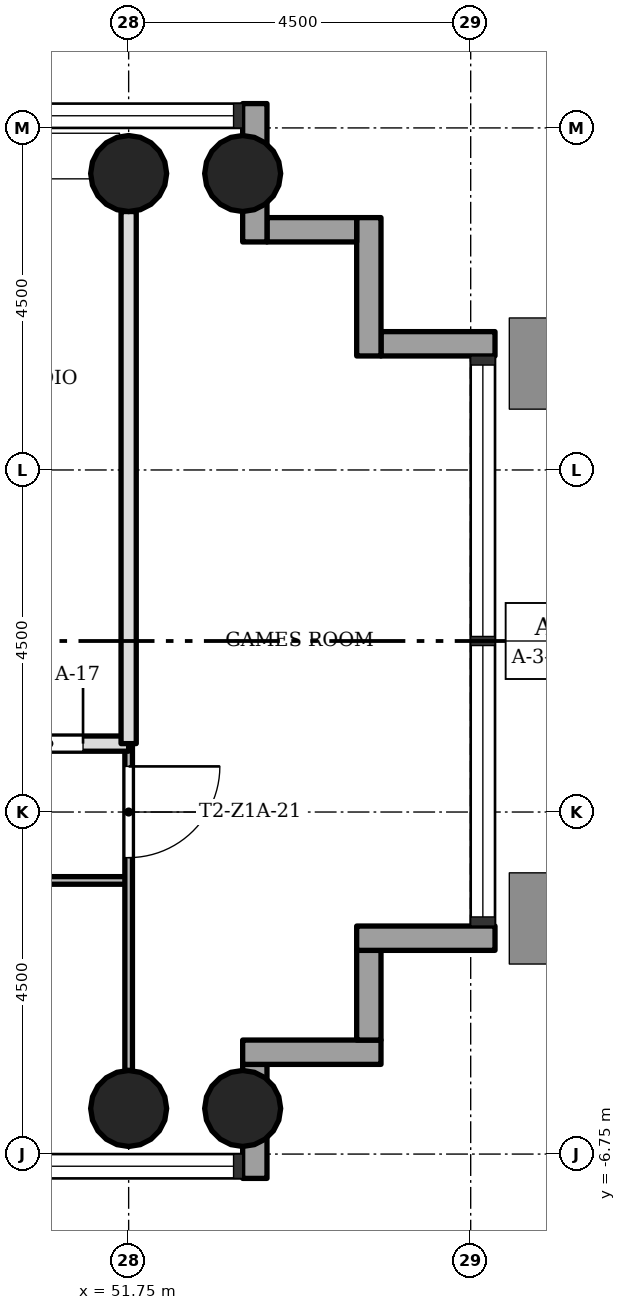
"""IFC4 building model, lengths in metres.
Left out: names, types, materials, properties, quantities, classifications, styles, units other than length and angle.
Written with IfcOpenShell. Run it as: python <this file> out.ifc"""

import sys

from ifc_helpers import new_model, si_unit, direction, frame, frame_2d, origin, origin_2d, place, context, subcontext, project, spatial, rectangle, hollow_circle, extrude, element, fill, save


model = new_model("IFC4")
c1 = context("Model", 3, precision=1e-05, world=origin(), true_north=direction((0.0, 1.0)))
c2 = subcontext(c1, "Body", "Model", "MODEL_VIEW")
j1 = project(units=[si_unit("LENGTHUNIT", "METRE"), si_unit("PLANEANGLEUNIT", "RADIAN")], contexts=[c1])
p1 = place(None, origin())
s1 = spatial("IfcSite", under=j1, at=p1, CompositionType="ELEMENT")
p2 = place(p1, origin())
s2 = spatial("IfcBuilding", under=s1, at=p2, CompositionType="ELEMENT")
p3 = place(p2, frame((0.0, 0.0, 31.3)))
s3 = spatial("IfcBuildingStorey", under=s2, at=p3, CompositionType="ELEMENT", Elevation=31.3)
for number, where, z_axis, x_axis in (
    (1, (51.75, -6.15, 0.0), (0.0, 0.0, 1.0), (1.0, 0.0, 0.0)),
    (2, (51.75, 6.15, 0.0), (0.0, 0.0, 1.0), (1.0, 0.0, 0.0)),
    (3, (53.25, -6.15, 0.0), (0.0, 0.0, 1.0), (1.0, 0.0, 0.0)),
    (4, (53.25, 6.15, 0.0), (0.0, 0.0, 1.0), (1.0, 0.0, 0.0)),
):
    element("IfcColumn", number, at=place(p3, frame(where, z_axis=z_axis, x_axis=x_axis)), inside=s3, PredefinedType="COLUMN", context=c2, shape_type="SweptSolid", body=[
        extrude(hollow_circle(Radius=0.5, WallThickness=0.036, at=origin_2d()), origin(), (0.0, 0.0, 1.0), 3.4),
    ])
p4 = place(p3, frame((53.41, -7.07, -0.3), z_axis=(0.0, 0.0, 1.0), x_axis=(0.0, 1.0, 0.0)))
e5 = element("IfcWall", 5, at=p4, inside=s3, PredefinedType="STANDARD", context=c2, shape_type="SweptSolid", body=[
    extrude(rectangle(XDim=1.5, YDim=0.32, at=frame_2d((0.75, 0.0))), origin(), (0.0, 0.0, 1.0), 3.4),
])
p5 = place(p3, frame((53.25, -5.41, -0.3), z_axis=(0.0, 0.0, 1.0), x_axis=(1.0, 0.0, 0.0)))
e6 = element("IfcWall", 6, at=p5, inside=s3, PredefinedType="STANDARD", context=c2, shape_type="SweptSolid", body=[
    extrude(rectangle(XDim=1.82, YDim=0.32, at=frame_2d((0.91, 0.0))), origin(), (0.0, 0.0, 1.0), 3.4),
])
p6 = place(p3, frame((54.91, -5.25, -0.3), z_axis=(0.0, 0.0, 1.0), x_axis=(0.0, 1.0, 0.0)))
e7 = element("IfcWall", 7, at=p6, inside=s3, PredefinedType="STANDARD", context=c2, shape_type="SweptSolid", body=[
    extrude(rectangle(XDim=1.18, YDim=0.32, at=frame_2d((0.59, 0.0))), origin(), (0.0, 0.0, 1.0), 3.4),
])
p7 = place(p3, frame((54.75, -3.91, -0.3), z_axis=(0.0, 0.0, 1.0), x_axis=(1.0, 0.0, 0.0)))
e8 = element("IfcWall", 8, at=p7, inside=s3, PredefinedType="STANDARD", context=c2, shape_type="SweptSolid", body=[
    extrude(rectangle(XDim=1.82, YDim=0.32, at=frame_2d((0.91, 0.0))), origin(), (0.0, 0.0, 1.0), 3.4),
])
p8 = place(p3, frame((56.57, 3.91, -0.3), z_axis=(0.0, 0.0, 1.0), x_axis=(-1.0, 0.0, 0.0)))
e9 = element("IfcWall", 9, at=p8, inside=s3, PredefinedType="STANDARD", context=c2, shape_type="SweptSolid", body=[
    extrude(rectangle(XDim=1.5, YDim=0.32, at=frame_2d((0.75, 0.0))), origin(), (0.0, 0.0, 1.0), 3.4),
])
p9 = place(p3, frame((54.91, 3.75, -0.3), z_axis=(0.0, 0.0, 1.0), x_axis=(0.0, 1.0, 0.0)))
e10 = element("IfcWall", 10, at=p9, inside=s3, PredefinedType="STANDARD", context=c2, shape_type="SweptSolid", body=[
    extrude(rectangle(XDim=1.82, YDim=0.32, at=frame_2d((0.91, 0.0))), origin(), (0.0, 0.0, 1.0), 3.4),
])
p10 = place(p3, frame((54.75, 5.41, -0.3), z_axis=(0.0, 0.0, 1.0), x_axis=(-1.0, 0.0, 0.0)))
e11 = element("IfcWall", 11, at=p10, inside=s3, PredefinedType="STANDARD", context=c2, shape_type="SweptSolid", body=[
    extrude(rectangle(XDim=1.18, YDim=0.32, at=frame_2d((0.59, 0.0))), origin(), (0.0, 0.0, 1.0), 3.4),
])
p11 = place(p3, frame((53.41, 5.25, -0.3), z_axis=(0.0, 0.0, 1.0), x_axis=(0.0, 1.0, 0.0)))
e12 = element("IfcWall", 12, at=p11, inside=s3, PredefinedType="STANDARD", context=c2, shape_type="SweptSolid", body=[
    extrude(rectangle(XDim=1.82, YDim=0.32, at=frame_2d((0.91, 0.0))), origin(), (0.0, 0.0, 1.0), 3.4),
])
p12 = place(p3, frame((51.75, -3.15, 0.0), z_axis=(0.0, 0.0, 1.0), x_axis=(-1.0, 0.0, 0.0)))
e13 = element("IfcWall", 13, at=p12, inside=s3, PredefinedType="PARTITIONING", context=c2, shape_type="SweptSolid", body=[
    extrude(rectangle(XDim=9.0, YDim=0.1, at=frame_2d((4.5, 0.0))), origin(), (0.0, 0.0, 1.0), 3.0),
])
p13 = place(p12, frame((6.3, 0.0, 0.0)))
e14 = element("IfcOpeningElement", 14, at=p13, cuts=e13, PredefinedType="OPENING", context=c2, shape_type="SweptSolid", body=[
    extrude(rectangle(XDim=0.9, YDim=2.1, at=frame_2d((0.45, 1.05))), frame((0.0, 0.06, 0.0), z_axis=(0.0, -1.0, 0.0), x_axis=(1.0, 0.0, 0.0)), (0.0, 0.0, 1.0), 0.12),
])
p14 = place(p12, frame((1.8, 0.0, 0.0)))
e15 = element("IfcOpeningElement", 15, at=p14, cuts=e13, PredefinedType="OPENING", context=c2, shape_type="SweptSolid", body=[
    extrude(rectangle(XDim=0.9, YDim=2.1, at=frame_2d((0.45, 1.05))), frame((0.0, 0.06, 0.0), z_axis=(0.0, -1.0, 0.0), x_axis=(1.0, 0.0, 0.0)), (0.0, 0.0, 1.0), 0.12),
])
p15 = place(p3, frame((51.75, -1.35, 0.0), z_axis=(0.0, 0.0, 1.0), x_axis=(-1.0, 0.0, 0.0)))
e16 = element("IfcWall", 16, at=p15, inside=s3, PredefinedType="SOLIDWALL", context=c2, shape_type="SweptSolid", body=[
    extrude(rectangle(XDim=4.5, YDim=0.2, at=frame_2d((2.25, 0.0))), origin(), (0.0, 0.0, 1.0), 3.0),
])
p16 = place(p15, frame((0.6, 0.0, 0.0)))
e17 = element("IfcOpeningElement", 17, at=p16, cuts=e16, PredefinedType="OPENING", context=c2, shape_type="SweptSolid", body=[
    extrude(rectangle(XDim=0.9, YDim=2.1, at=frame_2d((0.45, 1.05))), frame((0.0, 0.11, 0.0), z_axis=(0.0, -1.0, 0.0), x_axis=(1.0, 0.0, 0.0)), (0.0, 0.0, 1.0), 0.22),
])
p17 = place(p3, frame((51.75, -5.65, 0.0), z_axis=(0.0, 0.0, 1.0), x_axis=(0.0, 1.0, 0.0)))
e18 = element("IfcWall", 18, at=p17, inside=s3, PredefinedType="PARTITIONING", context=c2, shape_type="SweptSolid", body=[
    extrude(rectangle(XDim=4.3, YDim=0.1, at=frame_2d((2.15, 0.0))), origin(), (0.0, 0.0, 1.0), 3.0),
])
p18 = place(p17, frame((2.8, 0.0, 0.0)))
e19 = element("IfcOpeningElement", 19, at=p18, cuts=e18, PredefinedType="OPENING", context=c2, shape_type="SweptSolid", body=[
    extrude(rectangle(XDim=1.2, YDim=2.1, at=frame_2d((0.6, 1.05))), frame((0.0, 0.06, 0.0), z_axis=(0.0, -1.0, 0.0), x_axis=(1.0, 0.0, 0.0)), (0.0, 0.0, 1.0), 0.12),
])
p19 = place(p3, frame((51.75, -1.35, 0.0), z_axis=(0.0, 0.0, 1.0), x_axis=(0.0, 1.0, 0.0)))
e20 = element("IfcWall", 20, at=p19, inside=s3, PredefinedType="SOLIDWALL", context=c2, shape_type="SweptSolid", body=[
    extrude(rectangle(XDim=7.0, YDim=0.2, at=frame_2d((3.5, 0.0))), origin(), (0.0, 0.0, 1.0), 3.0),
])
p20 = place(p16, origin())
e21 = element("IfcDoor", 21, at=p20, inside=s3, OperationType="SINGLE_SWING_LEFT", PredefinedType="DOOR", context=c2, shape_type="SweptSolid", body=[
    extrude(rectangle(XDim=0.9, YDim=2.1, at=frame_2d((0.45, 1.05))), frame((0.0, 0.025, 0.0), z_axis=(0.0, -1.0, 0.0), x_axis=(1.0, 0.0, 0.0)), (0.0, 0.0, 1.0), 0.05),
])
fill(e17, e21)
p21 = place(p18, origin())
e22 = element("IfcDoor", 22, at=p21, inside=s3, OperationType="SINGLE_SWING_RIGHT", PredefinedType="DOOR", context=c2, shape_type="SweptSolid", body=[
    extrude(rectangle(XDim=1.2, YDim=2.1, at=frame_2d((0.6, 1.05))), frame((0.0, 0.025, 0.0), z_axis=(0.0, -1.0, 0.0), x_axis=(1.0, 0.0, 0.0)), (0.0, 0.0, 1.0), 0.05),
])
fill(e19, e22)
save(model, sys.argv[1])
